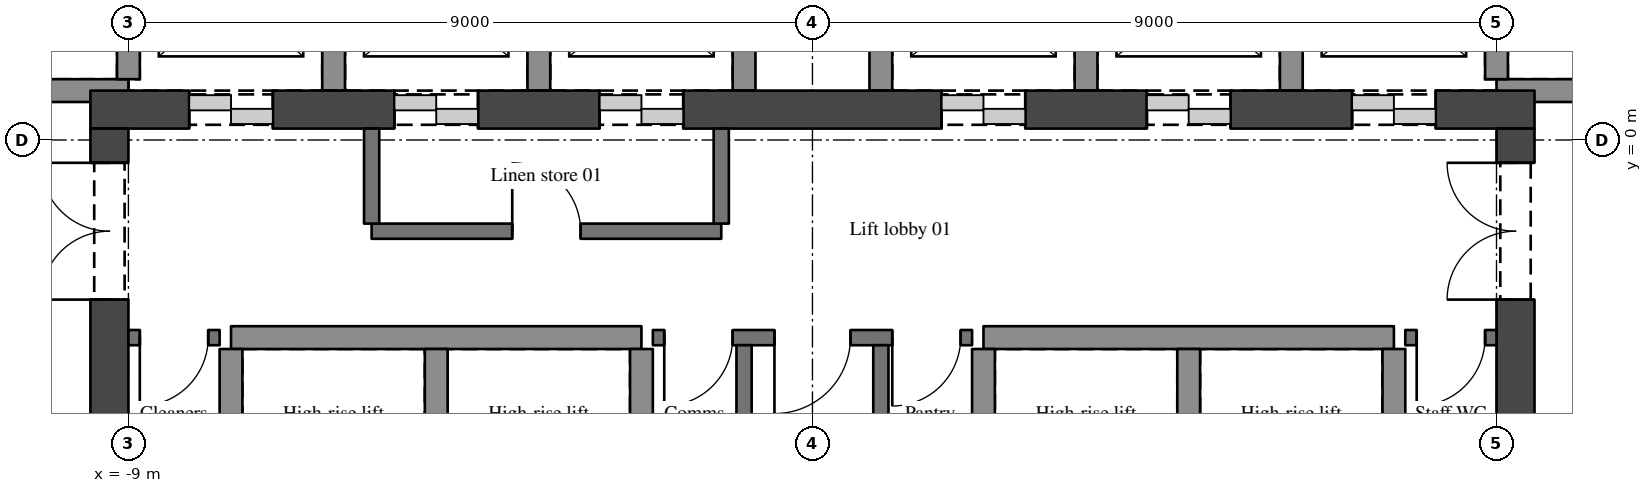
"""IFC4 building model, lengths in metres.
Left out: names, types, materials, properties, quantities, classifications, styles, units other than length and angle.
Written with IfcOpenShell. Run it as: python <this file> out.ifc"""

import sys

from ifc_helpers import new_model, si_unit, direction, frame, frame_2d, origin, place, context, subcontext, project, spatial, rectangle, extrude, element, fill, save


model = new_model("IFC4")
c1 = context("Model", 3, precision=1e-05, world=origin(), true_north=direction((0.0, 1.0)))
c2 = subcontext(c1, "Body", "Model", "MODEL_VIEW")
j1 = project(units=[si_unit("LENGTHUNIT", "METRE"), si_unit("PLANEANGLEUNIT", "RADIAN")], contexts=[c1])
p1 = place(None, origin())
s1 = spatial("IfcSite", under=j1, at=p1, CompositionType="ELEMENT")
p2 = place(p1, origin())
s2 = spatial("IfcBuilding", under=s1, at=p2, CompositionType="ELEMENT")
p3 = place(p2, frame((0.0, 0.0, 158.9)))
s3 = spatial("IfcBuildingStorey", under=s2, at=p3, CompositionType="ELEMENT", Elevation=158.9)
p4 = place(p3, frame((-9.5, 0.4, 0.0), z_axis=(0.0, 0.0, 1.0), x_axis=(1.0, 0.0, 0.0)))
e1 = element("IfcWall", 1, at=p4, inside=s3, PredefinedType="SHEAR", context=c2, shape_type="SweptSolid", body=[
    extrude(rectangle(XDim=19.0, YDim=0.5, at=frame_2d((9.5, 0.0))), origin(), (0.0, 0.0, 1.0), 3.4),
])
p5 = place(p4, frame((1.3, 0.0, 0.0)))
e2 = element("IfcOpeningElement", 2, at=p5, cuts=e1, PredefinedType="OPENING", context=c2, shape_type="SweptSolid", body=[
    extrude(rectangle(XDim=1.1, YDim=2.1, at=frame_2d((0.55, 1.05))), frame((0.0, 0.26, 0.0), z_axis=(0.0, -1.0, 0.0), x_axis=(1.0, 0.0, 0.0)), (0.0, 0.0, 1.0), 0.52),
])
p6 = place(p4, frame((4.0, 0.0, 0.0)))
e3 = element("IfcOpeningElement", 3, at=p6, cuts=e1, PredefinedType="OPENING", context=c2, shape_type="SweptSolid", body=[
    extrude(rectangle(XDim=1.1, YDim=2.1, at=frame_2d((0.55, 1.05))), frame((0.0, 0.26, 0.0), z_axis=(0.0, -1.0, 0.0), x_axis=(1.0, 0.0, 0.0)), (0.0, 0.0, 1.0), 0.52),
])
p7 = place(p4, frame((6.7, 0.0, 0.0)))
e4 = element("IfcOpeningElement", 4, at=p7, cuts=e1, PredefinedType="OPENING", context=c2, shape_type="SweptSolid", body=[
    extrude(rectangle(XDim=1.1, YDim=2.1, at=frame_2d((0.55, 1.05))), frame((0.0, 0.26, 0.0), z_axis=(0.0, -1.0, 0.0), x_axis=(1.0, 0.0, 0.0)), (0.0, 0.0, 1.0), 0.52),
])
p8 = place(p4, frame((11.2, 0.0, 0.0)))
e5 = element("IfcOpeningElement", 5, at=p8, cuts=e1, PredefinedType="OPENING", context=c2, shape_type="SweptSolid", body=[
    extrude(rectangle(XDim=1.1, YDim=2.1, at=frame_2d((0.55, 1.05))), frame((0.0, 0.26, 0.0), z_axis=(0.0, -1.0, 0.0), x_axis=(1.0, 0.0, 0.0)), (0.0, 0.0, 1.0), 0.52),
])
p9 = place(p4, frame((13.9, 0.0, 0.0)))
e6 = element("IfcOpeningElement", 6, at=p9, cuts=e1, PredefinedType="OPENING", context=c2, shape_type="SweptSolid", body=[
    extrude(rectangle(XDim=1.1, YDim=2.1, at=frame_2d((0.55, 1.05))), frame((0.0, 0.26, 0.0), z_axis=(0.0, -1.0, 0.0), x_axis=(1.0, 0.0, 0.0)), (0.0, 0.0, 1.0), 0.52),
])
p10 = place(p4, frame((16.6, 0.0, 0.0)))
e7 = element("IfcOpeningElement", 7, at=p10, cuts=e1, PredefinedType="OPENING", context=c2, shape_type="SweptSolid", body=[
    extrude(rectangle(XDim=1.1, YDim=2.1, at=frame_2d((0.55, 1.05))), frame((0.0, 0.26, 0.0), z_axis=(0.0, -1.0, 0.0), x_axis=(1.0, 0.0, 0.0)), (0.0, 0.0, 1.0), 0.52),
])
p11 = place(p3, frame((-9.25, -11.5, 0.0), z_axis=(0.0, 0.0, 1.0), x_axis=(0.0, 1.0, 0.0)))
e8 = element("IfcWall", 8, at=p11, inside=s3, PredefinedType="SHEAR", context=c2, shape_type="SweptSolid", body=[
    extrude(rectangle(XDim=11.65, YDim=0.5, at=frame_2d((5.825, 0.0))), origin(), (0.0, 0.0, 1.0), 3.4),
])
p12 = place(p11, frame((9.4, 0.0, 0.0)))
e9 = element("IfcOpeningElement", 9, at=p12, cuts=e8, PredefinedType="OPENING", context=c2, shape_type="SweptSolid", body=[
    extrude(rectangle(XDim=1.8, YDim=2.1, at=frame_2d((0.9, 1.05))), frame((0.0, 0.26, 0.0), z_axis=(0.0, -1.0, 0.0), x_axis=(1.0, 0.0, 0.0)), (0.0, 0.0, 1.0), 0.52),
])
p13 = place(p11, frame((5.25, 0.0, 0.0)))
e10 = element("IfcOpeningElement", 10, at=p13, cuts=e8, PredefinedType="OPENING", context=c2, shape_type="SweptSolid", body=[
    extrude(rectangle(XDim=1.1, YDim=2.1, at=frame_2d((0.55, 1.05))), frame((0.0, 0.26, 0.0), z_axis=(0.0, -1.0, 0.0), x_axis=(1.0, 0.0, 0.0)), (0.0, 0.0, 1.0), 0.52),
])
p14 = place(p3, frame((9.25, -11.5, 0.0), z_axis=(0.0, 0.0, 1.0), x_axis=(0.0, 1.0, 0.0)))
e11 = element("IfcWall", 11, at=p14, inside=s3, PredefinedType="SHEAR", context=c2, shape_type="SweptSolid", body=[
    extrude(rectangle(XDim=11.65, YDim=0.5, at=frame_2d((5.825, 0.0))), origin(), (0.0, 0.0, 1.0), 3.4),
])
p15 = place(p14, frame((9.4, 0.0, 0.0)))
e12 = element("IfcOpeningElement", 12, at=p15, cuts=e11, PredefinedType="OPENING", context=c2, shape_type="SweptSolid", body=[
    extrude(rectangle(XDim=1.8, YDim=2.1, at=frame_2d((0.9, 1.05))), frame((0.0, 0.26, 0.0), z_axis=(0.0, -1.0, 0.0), x_axis=(1.0, 0.0, 0.0)), (0.0, 0.0, 1.0), 0.52),
])
p16 = place(p14, frame((5.25, 0.0, 0.0)))
e13 = element("IfcOpeningElement", 13, at=p16, cuts=e11, PredefinedType="OPENING", context=c2, shape_type="SweptSolid", body=[
    extrude(rectangle(XDim=1.1, YDim=2.1, at=frame_2d((0.55, 1.05))), frame((0.0, 0.26, 0.0), z_axis=(0.0, -1.0, 0.0), x_axis=(1.0, 0.0, 0.0)), (0.0, 0.0, 1.0), 0.52),
])
p17 = place(p3, frame((-7.8, -2.6, 0.0), z_axis=(0.0, 0.0, 1.0), x_axis=(-1.0, 0.0, 0.0)))
e14 = element("IfcWall", 14, at=p17, inside=s3, PredefinedType="SOLIDWALL", context=c2, shape_type="SweptSolid", body=[
    extrude(rectangle(XDim=1.2, YDim=0.2, at=frame_2d((0.6, 0.0))), origin(), (0.0, 0.0, 1.0), 3.1),
])
p18 = place(p17, frame((0.15, 0.0, 0.0)))
e15 = element("IfcOpeningElement", 15, at=p18, cuts=e14, PredefinedType="OPENING", context=c2, shape_type="SweptSolid", body=[
    extrude(rectangle(XDim=0.9, YDim=2.1, at=frame_2d((0.45, 1.05))), frame((0.0, 0.11, 0.0), z_axis=(0.0, -1.0, 0.0), x_axis=(1.0, 0.0, 0.0)), (0.0, 0.0, 1.0), 0.22),
])
p19 = place(p3, frame((-7.65, -2.6, 0.0), z_axis=(0.0, 0.0, 1.0), x_axis=(1.0, 0.0, 0.0)))
e16 = element("IfcWall", 16, at=p19, inside=s3, PredefinedType="SHEAR", context=c2, shape_type="SweptSolid", body=[
    extrude(rectangle(XDim=5.4, YDim=0.3, at=frame_2d((2.7, 0.0))), origin(), (0.0, 0.0, 1.0), 3.4),
])
p20 = place(p3, frame((2.1, -2.6, 0.0), z_axis=(0.0, 0.0, 1.0), x_axis=(-1.0, 0.0, 0.0)))
e17 = element("IfcWall", 17, at=p20, inside=s3, PredefinedType="SOLIDWALL", context=c2, shape_type="SweptSolid", body=[
    extrude(rectangle(XDim=4.2, YDim=0.2, at=frame_2d((2.1, 0.0))), origin(), (0.0, 0.0, 1.0), 3.1),
])
p21 = place(p20, frame((1.6, 0.0, 0.0)))
e18 = element("IfcOpeningElement", 18, at=p21, cuts=e17, PredefinedType="OPENING", context=c2, shape_type="SweptSolid", body=[
    extrude(rectangle(XDim=1.0, YDim=2.1, at=frame_2d((0.5, 1.05))), frame((0.0, 0.11, 0.0), z_axis=(0.0, -1.0, 0.0), x_axis=(1.0, 0.0, 0.0)), (0.0, 0.0, 1.0), 0.22),
])
p22 = place(p20, frame((3.15, 0.0, 0.0)))
e19 = element("IfcOpeningElement", 19, at=p22, cuts=e17, PredefinedType="OPENING", context=c2, shape_type="SweptSolid", body=[
    extrude(rectangle(XDim=0.9, YDim=2.1, at=frame_2d((0.45, 1.05))), frame((0.0, 0.11, 0.0), z_axis=(0.0, -1.0, 0.0), x_axis=(1.0, 0.0, 0.0)), (0.0, 0.0, 1.0), 0.22),
])
p23 = place(p20, frame((0.15, 0.0, 0.0)))
e20 = element("IfcOpeningElement", 20, at=p23, cuts=e17, PredefinedType="OPENING", context=c2, shape_type="SweptSolid", body=[
    extrude(rectangle(XDim=0.9, YDim=2.1, at=frame_2d((0.45, 1.05))), frame((0.0, 0.11, 0.0), z_axis=(0.0, -1.0, 0.0), x_axis=(1.0, 0.0, 0.0)), (0.0, 0.0, 1.0), 0.22),
])
p24 = place(p3, frame((2.25, -2.6, 0.0), z_axis=(0.0, 0.0, 1.0), x_axis=(1.0, 0.0, 0.0)))
e21 = element("IfcWall", 21, at=p24, inside=s3, PredefinedType="SHEAR", context=c2, shape_type="SweptSolid", body=[
    extrude(rectangle(XDim=5.4, YDim=0.3, at=frame_2d((2.7, 0.0))), origin(), (0.0, 0.0, 1.0), 3.4),
])
p25 = place(p3, frame((9.0, -2.6, 0.0), z_axis=(0.0, 0.0, 1.0), x_axis=(-1.0, 0.0, 0.0)))
e22 = element("IfcWall", 22, at=p25, inside=s3, PredefinedType="SOLIDWALL", context=c2, shape_type="SweptSolid", body=[
    extrude(rectangle(XDim=1.2, YDim=0.2, at=frame_2d((0.6, 0.0))), origin(), (0.0, 0.0, 1.0), 3.1),
])
p26 = place(p25, frame((0.15, 0.0, 0.0)))
e23 = element("IfcOpeningElement", 23, at=p26, cuts=e22, PredefinedType="OPENING", context=c2, shape_type="SweptSolid", body=[
    extrude(rectangle(XDim=0.9, YDim=2.1, at=frame_2d((0.45, 1.05))), frame((0.0, 0.11, 0.0), z_axis=(0.0, -1.0, 0.0), x_axis=(1.0, 0.0, 0.0)), (0.0, 0.0, 1.0), 0.22),
])
p27 = place(p3, frame((-5.8, -1.2, 0.0), z_axis=(0.0, 0.0, 1.0), x_axis=(1.0, 0.0, 0.0)))
e24 = element("IfcWall", 24, at=p27, inside=s3, PredefinedType="SOLIDWALL", context=c2, shape_type="SweptSolid", body=[
    extrude(rectangle(XDim=4.6, YDim=0.2, at=frame_2d((2.3, 0.0))), origin(), (0.0, 0.0, 1.0), 3.1),
])
p28 = place(p27, frame((1.85, 0.0, 0.0)))
e25 = element("IfcOpeningElement", 25, at=p28, cuts=e24, PredefinedType="OPENING", context=c2, shape_type="SweptSolid", body=[
    extrude(rectangle(XDim=0.9, YDim=2.1, at=frame_2d((0.45, 1.05))), frame((0.0, 0.11, 0.0), z_axis=(0.0, -1.0, 0.0), x_axis=(1.0, 0.0, 0.0)), (0.0, 0.0, 1.0), 0.22),
])
for number, where, z_axis, x_axis in (
    (26, (-9.0, 0.65, 0.0), (0.0, 0.0, 1.0), (-1.0, 0.0, 0.0)),
    (27, (12.25, 0.65, 0.0), (0.0, 0.0, 1.0), (-1.0, 0.0, 0.0)),
):
    element("IfcWall", number, at=place(p3, frame(where, z_axis=z_axis, x_axis=x_axis)), inside=s3, PredefinedType="SHEAR", context=c2, shape_type="SweptSolid", body=[
        extrude(rectangle(XDim=3.25, YDim=0.3, at=frame_2d((1.625, 0.0))), origin(), (0.0, 0.0, 1.0), 3.4),
    ])
p29 = place(p3, frame((-9.0, 0.8, 0.0), z_axis=(0.0, 0.0, 1.0), x_axis=(0.0, 1.0, 0.0)))
e28 = element("IfcWall", 28, at=p29, inside=s3, PredefinedType="SHEAR", context=c2, shape_type="SweptSolid", body=[
    extrude(rectangle(XDim=2.35, YDim=0.3, at=frame_2d((1.175, 0.0))), origin(), (0.0, 0.0, 1.0), 3.4),
])
p30 = place(p3, frame((-7.65, -4.8, 0.0), z_axis=(0.0, 0.0, 1.0), x_axis=(0.0, 1.0, 0.0)))
e29 = element("IfcWall", 29, at=p30, inside=s3, PredefinedType="SHEAR", context=c2, shape_type="SweptSolid", body=[
    extrude(rectangle(XDim=2.05, YDim=0.3, at=frame_2d((1.025, 0.0))), origin(), (0.0, 0.0, 1.0), 3.4),
])
p31 = place(p3, frame((-6.3, 0.65, 0.0), z_axis=(0.0, 0.0, 1.0), x_axis=(0.0, 1.0, 0.0)))
e30 = element("IfcWall", 30, at=p31, inside=s3, PredefinedType="SHEAR", context=c2, shape_type="SweptSolid", body=[
    extrude(rectangle(XDim=2.5, YDim=0.3, at=frame_2d((1.25, 0.0))), origin(), (0.0, 0.0, 1.0), 3.4),
])
p32 = place(p3, frame((-5.8, -1.1, 0.0), z_axis=(0.0, 0.0, 1.0), x_axis=(0.0, 1.0, 0.0)))
e31 = element("IfcWall", 31, at=p32, inside=s3, PredefinedType="SOLIDWALL", context=c2, shape_type="SweptSolid", body=[
    extrude(rectangle(XDim=1.25, YDim=0.2, at=frame_2d((0.625, 0.0))), origin(), (0.0, 0.0, 1.0), 3.1),
])
p33 = place(p3, frame((-4.95, -4.8, 0.0), z_axis=(0.0, 0.0, 1.0), x_axis=(0.0, 1.0, 0.0)))
e32 = element("IfcWall", 32, at=p33, inside=s3, PredefinedType="SHEAR", context=c2, shape_type="SweptSolid", body=[
    extrude(rectangle(XDim=2.05, YDim=0.3, at=frame_2d((1.025, 0.0))), origin(), (0.0, 0.0, 1.0), 3.4),
])
p34 = place(p3, frame((-3.6, 0.65, 0.0), z_axis=(0.0, 0.0, 1.0), x_axis=(0.0, 1.0, 0.0)))
e33 = element("IfcWall", 33, at=p34, inside=s3, PredefinedType="SHEAR", context=c2, shape_type="SweptSolid", body=[
    extrude(rectangle(XDim=2.5, YDim=0.3, at=frame_2d((1.25, 0.0))), origin(), (0.0, 0.0, 1.0), 3.4),
])
p35 = place(p3, frame((-2.25, -4.8, 0.0), z_axis=(0.0, 0.0, 1.0), x_axis=(0.0, 1.0, 0.0)))
e34 = element("IfcWall", 34, at=p35, inside=s3, PredefinedType="SHEAR", context=c2, shape_type="SweptSolid", body=[
    extrude(rectangle(XDim=2.05, YDim=0.3, at=frame_2d((1.025, 0.0))), origin(), (0.0, 0.0, 1.0), 3.4),
])
p36 = place(p3, frame((-1.2, -1.1, 0.0), z_axis=(0.0, 0.0, 1.0), x_axis=(0.0, 1.0, 0.0)))
e35 = element("IfcWall", 35, at=p36, inside=s3, PredefinedType="SOLIDWALL", context=c2, shape_type="SweptSolid", body=[
    extrude(rectangle(XDim=1.25, YDim=0.2, at=frame_2d((0.625, 0.0))), origin(), (0.0, 0.0, 1.0), 3.1),
])
p37 = place(p3, frame((-0.9, -4.85, 0.0), z_axis=(0.0, 0.0, 1.0), x_axis=(0.0, 1.0, 0.0)))
e36 = element("IfcWall", 36, at=p37, inside=s3, PredefinedType="SOLIDWALL", context=c2, shape_type="SweptSolid", body=[
    extrude(rectangle(XDim=2.15, YDim=0.2, at=frame_2d((1.075, 0.0))), origin(), (0.0, 0.0, 1.0), 3.1),
])
p38 = place(p3, frame((-0.9, 0.65, 0.0), z_axis=(0.0, 0.0, 1.0), x_axis=(0.0, 1.0, 0.0)))
e37 = element("IfcWall", 37, at=p38, inside=s3, PredefinedType="SHEAR", context=c2, shape_type="SweptSolid", body=[
    extrude(rectangle(XDim=2.5, YDim=0.3, at=frame_2d((1.25, 0.0))), origin(), (0.0, 0.0, 1.0), 3.4),
])
p39 = place(p3, frame((0.9, -4.85, 0.0), z_axis=(0.0, 0.0, 1.0), x_axis=(0.0, 1.0, 0.0)))
e38 = element("IfcWall", 38, at=p39, inside=s3, PredefinedType="SOLIDWALL", context=c2, shape_type="SweptSolid", body=[
    extrude(rectangle(XDim=2.15, YDim=0.2, at=frame_2d((1.075, 0.0))), origin(), (0.0, 0.0, 1.0), 3.1),
])
p40 = place(p3, frame((0.9, 0.65, 0.0), z_axis=(0.0, 0.0, 1.0), x_axis=(0.0, 1.0, 0.0)))
e39 = element("IfcWall", 39, at=p40, inside=s3, PredefinedType="SHEAR", context=c2, shape_type="SweptSolid", body=[
    extrude(rectangle(XDim=2.5, YDim=0.3, at=frame_2d((1.25, 0.0))), origin(), (0.0, 0.0, 1.0), 3.4),
])
p41 = place(p3, frame((2.25, -4.8, 0.0), z_axis=(0.0, 0.0, 1.0), x_axis=(0.0, 1.0, 0.0)))
e40 = element("IfcWall", 40, at=p41, inside=s3, PredefinedType="SHEAR", context=c2, shape_type="SweptSolid", body=[
    extrude(rectangle(XDim=2.05, YDim=0.3, at=frame_2d((1.025, 0.0))), origin(), (0.0, 0.0, 1.0), 3.4),
])
p42 = place(p3, frame((3.6, 0.65, 0.0), z_axis=(0.0, 0.0, 1.0), x_axis=(0.0, 1.0, 0.0)))
e41 = element("IfcWall", 41, at=p42, inside=s3, PredefinedType="SHEAR", context=c2, shape_type="SweptSolid", body=[
    extrude(rectangle(XDim=2.5, YDim=0.3, at=frame_2d((1.25, 0.0))), origin(), (0.0, 0.0, 1.0), 3.4),
])
p43 = place(p3, frame((4.95, -4.8, 0.0), z_axis=(0.0, 0.0, 1.0), x_axis=(0.0, 1.0, 0.0)))
e42 = element("IfcWall", 42, at=p43, inside=s3, PredefinedType="SHEAR", context=c2, shape_type="SweptSolid", body=[
    extrude(rectangle(XDim=2.05, YDim=0.3, at=frame_2d((1.025, 0.0))), origin(), (0.0, 0.0, 1.0), 3.4),
])
p44 = place(p3, frame((6.3, 0.65, 0.0), z_axis=(0.0, 0.0, 1.0), x_axis=(0.0, 1.0, 0.0)))
e43 = element("IfcWall", 43, at=p44, inside=s3, PredefinedType="SHEAR", context=c2, shape_type="SweptSolid", body=[
    extrude(rectangle(XDim=2.5, YDim=0.3, at=frame_2d((1.25, 0.0))), origin(), (0.0, 0.0, 1.0), 3.4),
])
p45 = place(p3, frame((7.65, -4.8, 0.0), z_axis=(0.0, 0.0, 1.0), x_axis=(0.0, 1.0, 0.0)))
e44 = element("IfcWall", 44, at=p45, inside=s3, PredefinedType="SHEAR", context=c2, shape_type="SweptSolid", body=[
    extrude(rectangle(XDim=2.05, YDim=0.3, at=frame_2d((1.025, 0.0))), origin(), (0.0, 0.0, 1.0), 3.4),
])
p46 = place(p3, frame((9.0, 0.8, 0.0), z_axis=(0.0, 0.0, 1.0), x_axis=(0.0, 1.0, 0.0)))
e45 = element("IfcWall", 45, at=p46, inside=s3, PredefinedType="SHEAR", context=c2, shape_type="SweptSolid", body=[
    extrude(rectangle(XDim=2.35, YDim=0.3, at=frame_2d((1.175, 0.0))), origin(), (0.0, 0.0, 1.0), 3.4),
])
p47 = place(p15, origin())
e46 = element("IfcDoor", 46, at=p47, inside=s3, OperationType="DOUBLE_DOOR_SINGLE_SWING", PredefinedType="DOOR", context=c2, shape_type="SweptSolid", body=[
    extrude(rectangle(XDim=1.8, YDim=2.1, at=frame_2d((0.9, 1.05))), frame((0.0, 0.025, 0.0), z_axis=(0.0, -1.0, 0.0), x_axis=(1.0, 0.0, 0.0)), (0.0, 0.0, 1.0), 0.05),
])
fill(e12, e46)
p48 = place(p12, origin())
e47 = element("IfcDoor", 47, at=p48, inside=s3, OperationType="DOUBLE_DOOR_SINGLE_SWING", PredefinedType="DOOR", context=c2, shape_type="SweptSolid", body=[
    extrude(rectangle(XDim=1.8, YDim=2.1, at=frame_2d((0.9, 1.05))), frame((0.0, 0.025, 0.0), z_axis=(0.0, -1.0, 0.0), x_axis=(1.0, 0.0, 0.0)), (0.0, 0.0, 1.0), 0.05),
])
fill(e9, e47)
p49 = place(p21, origin())
e48 = element("IfcDoor", 48, at=p49, inside=s3, OperationType="SINGLE_SWING_RIGHT", PredefinedType="DOOR", context=c2, shape_type="SweptSolid", body=[
    extrude(rectangle(XDim=1.0, YDim=2.1, at=frame_2d((0.5, 1.05))), frame((0.0, 0.025, 0.0), z_axis=(0.0, -1.0, 0.0), x_axis=(1.0, 0.0, 0.0)), (0.0, 0.0, 1.0), 0.05),
])
fill(e18, e48)
p50 = place(p22, origin())
e49 = element("IfcDoor", 49, at=p50, inside=s3, OperationType="SINGLE_SWING_RIGHT", PredefinedType="DOOR", context=c2, shape_type="SweptSolid", body=[
    extrude(rectangle(XDim=0.9, YDim=2.1, at=frame_2d((0.45, 1.05))), frame((0.0, 0.025, 0.0), z_axis=(0.0, -1.0, 0.0), x_axis=(1.0, 0.0, 0.0)), (0.0, 0.0, 1.0), 0.05),
])
fill(e19, e49)
p51 = place(p23, origin())
e50 = element("IfcDoor", 50, at=p51, inside=s3, OperationType="SINGLE_SWING_RIGHT", PredefinedType="DOOR", context=c2, shape_type="SweptSolid", body=[
    extrude(rectangle(XDim=0.9, YDim=2.1, at=frame_2d((0.45, 1.05))), frame((0.0, 0.025, 0.0), z_axis=(0.0, -1.0, 0.0), x_axis=(1.0, 0.0, 0.0)), (0.0, 0.0, 1.0), 0.05),
])
fill(e20, e50)
p52 = place(p26, origin())
e51 = element("IfcDoor", 51, at=p52, inside=s3, OperationType="SINGLE_SWING_RIGHT", PredefinedType="DOOR", context=c2, shape_type="SweptSolid", body=[
    extrude(rectangle(XDim=0.9, YDim=2.1, at=frame_2d((0.45, 1.05))), frame((0.0, 0.025, 0.0), z_axis=(0.0, -1.0, 0.0), x_axis=(1.0, 0.0, 0.0)), (0.0, 0.0, 1.0), 0.05),
])
fill(e23, e51)
p53 = place(p18, origin())
e52 = element("IfcDoor", 52, at=p53, inside=s3, OperationType="SINGLE_SWING_RIGHT", PredefinedType="DOOR", context=c2, shape_type="SweptSolid", body=[
    extrude(rectangle(XDim=0.9, YDim=2.1, at=frame_2d((0.45, 1.05))), frame((0.0, 0.025, 0.0), z_axis=(0.0, -1.0, 0.0), x_axis=(1.0, 0.0, 0.0)), (0.0, 0.0, 1.0), 0.05),
])
fill(e15, e52)
p54 = place(p28, origin())
e53 = element("IfcDoor", 53, at=p54, inside=s3, OperationType="SINGLE_SWING_LEFT", PredefinedType="DOOR", context=c2, shape_type="SweptSolid", body=[
    extrude(rectangle(XDim=0.9, YDim=2.1, at=frame_2d((0.45, 1.05))), frame((0.0, 0.025, 0.0), z_axis=(0.0, -1.0, 0.0), x_axis=(1.0, 0.0, 0.0)), (0.0, 0.0, 1.0), 0.05),
])
fill(e25, e53)
p55 = place(p5, origin())
e54 = element("IfcDoor", 54, at=p55, inside=s3, OperationType="DOUBLE_DOOR_SLIDING", PredefinedType="DOOR", context=c2, shape_type="SweptSolid", body=[
    extrude(rectangle(XDim=1.1, YDim=2.1, at=frame_2d((0.55, 1.05))), frame((0.0, 0.025, 0.0), z_axis=(0.0, -1.0, 0.0), x_axis=(1.0, 0.0, 0.0)), (0.0, 0.0, 1.0), 0.05),
])
fill(e2, e54)
p56 = place(p6, origin())
e55 = element("IfcDoor", 55, at=p56, inside=s3, OperationType="DOUBLE_DOOR_SLIDING", PredefinedType="DOOR", context=c2, shape_type="SweptSolid", body=[
    extrude(rectangle(XDim=1.1, YDim=2.1, at=frame_2d((0.55, 1.05))), frame((0.0, 0.025, 0.0), z_axis=(0.0, -1.0, 0.0), x_axis=(1.0, 0.0, 0.0)), (0.0, 0.0, 1.0), 0.05),
])
fill(e3, e55)
p57 = place(p7, origin())
e56 = element("IfcDoor", 56, at=p57, inside=s3, OperationType="DOUBLE_DOOR_SLIDING", PredefinedType="DOOR", context=c2, shape_type="SweptSolid", body=[
    extrude(rectangle(XDim=1.1, YDim=2.1, at=frame_2d((0.55, 1.05))), frame((0.0, 0.025, 0.0), z_axis=(0.0, -1.0, 0.0), x_axis=(1.0, 0.0, 0.0)), (0.0, 0.0, 1.0), 0.05),
])
fill(e4, e56)
p58 = place(p8, origin())
e57 = element("IfcDoor", 57, at=p58, inside=s3, OperationType="DOUBLE_DOOR_SLIDING", PredefinedType="DOOR", context=c2, shape_type="SweptSolid", body=[
    extrude(rectangle(XDim=1.1, YDim=2.1, at=frame_2d((0.55, 1.05))), frame((0.0, 0.025, 0.0), z_axis=(0.0, -1.0, 0.0), x_axis=(1.0, 0.0, 0.0)), (0.0, 0.0, 1.0), 0.05),
])
fill(e5, e57)
p59 = place(p9, origin())
e58 = element("IfcDoor", 58, at=p59, inside=s3, OperationType="DOUBLE_DOOR_SLIDING", PredefinedType="DOOR", context=c2, shape_type="SweptSolid", body=[
    extrude(rectangle(XDim=1.1, YDim=2.1, at=frame_2d((0.55, 1.05))), frame((0.0, 0.025, 0.0), z_axis=(0.0, -1.0, 0.0), x_axis=(1.0, 0.0, 0.0)), (0.0, 0.0, 1.0), 0.05),
])
fill(e6, e58)
p60 = place(p10, origin())
e59 = element("IfcDoor", 59, at=p60, inside=s3, OperationType="DOUBLE_DOOR_SLIDING", PredefinedType="DOOR", context=c2, shape_type="SweptSolid", body=[
    extrude(rectangle(XDim=1.1, YDim=2.1, at=frame_2d((0.55, 1.05))), frame((0.0, 0.025, 0.0), z_axis=(0.0, -1.0, 0.0), x_axis=(1.0, 0.0, 0.0)), (0.0, 0.0, 1.0), 0.05),
])
fill(e7, e59)
save(model, sys.argv[1])
